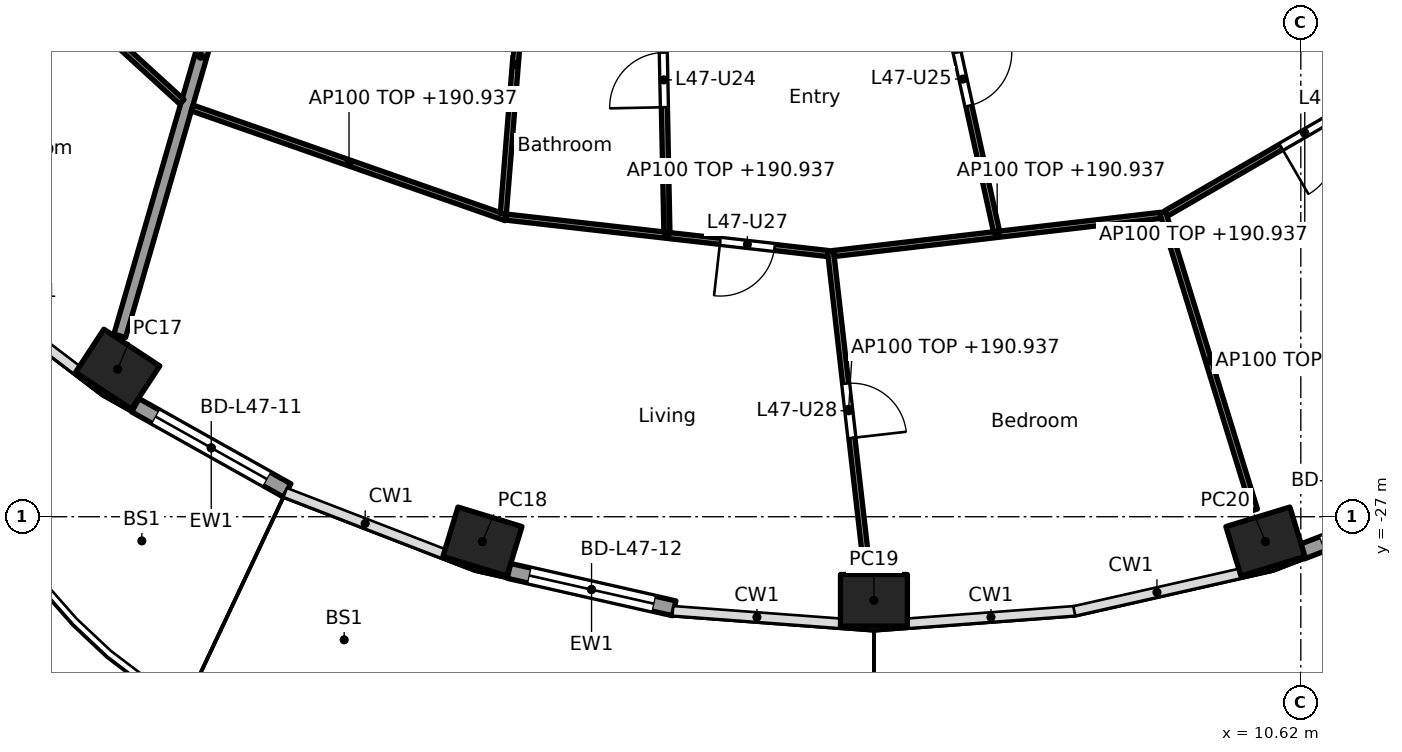
"""IFC4 building model, lengths in metres.
Left out: names, types, materials, properties, quantities, classifications, styles, units other than length and angle.
Written with IfcOpenShell. Run it as: python <this file> out.ifc"""

import sys

from ifc_helpers import new_model, si_unit, direction, frame, frame_2d, origin, origin_2d, place, context, subcontext, project, spatial, rectangle, hollow_rectangle, extrude, element, fill, save


model = new_model("IFC4")
c1 = context("Model", 3, precision=1e-05, world=origin(), true_north=direction((0.0, 1.0)))
c2 = subcontext(c1, "Body", "Model", "MODEL_VIEW")
j1 = project(units=[si_unit("LENGTHUNIT", "METRE"), si_unit("PLANEANGLEUNIT", "RADIAN")], contexts=[c1])
p1 = place(None, origin())
s1 = spatial("IfcSite", under=j1, at=p1, CompositionType="ELEMENT")
p2 = place(p1, origin())
s2 = spatial("IfcBuilding", under=s1, at=p2, CompositionType="ELEMENT")
p3 = place(p2, frame((0.0, 0.0, 188.1)))
s3 = spatial("IfcBuildingStorey", under=s2, at=p3, CompositionType="ELEMENT", Elevation=188.1)
for number, where, z_axis, x_axis in (
    (1, (-8.837, -24.573, 0.0), (0.0, 0.0, 1.0), (0.836, -0.549, 0.0)),
    (2, (-2.838, -27.408, 0.0), (0.0, 0.0, 1.0), (0.957, -0.292, 0.0)),
    (3, (3.6, -28.375, 0.0), (0.0, 0.0, 1.0), (1.0, 0.0, 0.0)),
    (4, (10.038, -27.408, 0.0), (0.0, 0.0, 1.0), (0.957, 0.292, 0.0)),
):
    element("IfcColumn", number, at=place(p3, frame(where, z_axis=z_axis, x_axis=x_axis)), inside=s3, PredefinedType="COLUMN", context=c2, shape_type="SweptSolid", body=[
        extrude(hollow_rectangle(XDim=1.1, YDim=0.85, WallThickness=0.036, at=origin_2d()), origin(), (0.0, 0.0, 1.0), 3.7),
    ])
p4 = place(p3, frame((-6.049, -26.568, 0.0), z_axis=(0.0, 0.0, 1.0), x_axis=(-0.872078262455, 0.489366431371, 0.0)))
e5 = element("IfcWall", 5, at=p4, inside=s3, PredefinedType="SOLIDWALL", context=c2, shape_type="SweptSolid", body=[
    extrude(rectangle(XDim=2.864, YDim=0.25, at=frame_2d((1.432, 0.0))), origin(), (0.0, 0.0, 1.0), 3.44),
])
p5 = place(p4, frame((0.382, 0.0, 0.0)))
e6 = element("IfcOpeningElement", 6, at=p5, cuts=e5, PredefinedType="OPENING", context=c2, shape_type="SweptSolid", body=[
    extrude(rectangle(XDim=2.1, YDim=2.4, at=frame_2d((1.05, 1.2))), frame((0.0, 0.135, 0.0), z_axis=(0.0, -1.0, 0.0), x_axis=(1.0, 0.0, 0.0)), (0.0, 0.0, 1.0), 0.27),
])
p6 = place(p3, frame((0.315, -28.506, 0.0), z_axis=(0.0, 0.0, 1.0), x_axis=(-0.975324329911, 0.220776926974, 0.0)))
e7 = element("IfcWall", 7, at=p6, inside=s3, PredefinedType="SOLIDWALL", context=c2, shape_type="SweptSolid", body=[
    extrude(rectangle(XDim=2.788, YDim=0.25, at=frame_2d((1.394, 0.0))), origin(), (0.0, 0.0, 1.0), 3.44),
])
p7 = place(p6, frame((0.344, 0.0, 0.0)))
e8 = element("IfcOpeningElement", 8, at=p7, cuts=e7, PredefinedType="OPENING", context=c2, shape_type="SweptSolid", body=[
    extrude(rectangle(XDim=2.1, YDim=2.4, at=frame_2d((1.05, 1.2))), frame((0.0, 0.135, 0.0), z_axis=(0.0, -1.0, 0.0), x_axis=(1.0, 0.0, 0.0)), (0.0, 0.0, 1.0), 0.27),
])
p8 = place(p3, frame((13.266, -26.56, 0.0), z_axis=(0.0, 0.0, 1.0), x_axis=(-0.932806734513, -0.360377019311, 0.0)))
e9 = element("IfcWall", 9, at=p8, inside=s3, PredefinedType="SOLIDWALL", context=c2, shape_type="SweptSolid", body=[
    extrude(rectangle(XDim=2.82, YDim=0.25, at=frame_2d((1.41, 0.0))), origin(), (0.0, 0.0, 1.0), 3.44),
])
p9 = place(p8, frame((0.36, 0.0, 0.0)))
e10 = element("IfcOpeningElement", 10, at=p9, cuts=e9, PredefinedType="OPENING", context=c2, shape_type="SweptSolid", body=[
    extrude(rectangle(XDim=2.1, YDim=2.4, at=frame_2d((1.05, 1.2))), frame((0.0, 0.135, 0.0), z_axis=(0.0, -1.0, 0.0), x_axis=(1.0, 0.0, 0.0)), (0.0, 0.0, 1.0), 0.27),
])
p10 = place(p3, frame((-6.137, -14.83, 0.0), z_axis=(0.0, 0.0, 1.0), x_axis=(-0.278461169897, -0.96044748782, 0.0)))
e11 = element("IfcWall", 11, at=p10, inside=s3, PredefinedType="PARTITIONING", context=c2, shape_type="SweptSolid", body=[
    extrude(rectangle(XDim=9.573, YDim=0.2, at=frame_2d((4.787, 0.0))), origin(), (0.0, 0.0, 1.0), 2.837),
])
p11 = place(p3, frame((-11.766, -16.535, 0.0), z_axis=(0.0, 0.0, 1.0), x_axis=(0.73807320557, -0.674720640872, 0.0)))
e12 = element("IfcWall", 12, at=p11, inside=s3, PredefinedType="PARTITIONING", context=c2, shape_type="SweptSolid", body=[
    extrude(rectangle(XDim=5.399, YDim=0.1, at=frame_2d((2.699, 0.0))), origin(), (0.0, 0.0, 1.0), 2.837),
])
p12 = place(p3, frame((-7.613, -20.278, 0.0), z_axis=(0.0, 0.0, 1.0), x_axis=(0.943918212431, -0.330179357684, 0.0)))
e13 = element("IfcWall", 13, at=p12, inside=s3, PredefinedType="PARTITIONING", context=c2, shape_type="SweptSolid", body=[
    extrude(rectangle(XDim=5.467, YDim=0.1, at=frame_2d((2.734, 0.0))), origin(), (0.0, 0.0, 1.0), 2.837),
])
p13 = place(p3, frame((-2.101, -17.113, 0.0), z_axis=(0.0, 0.0, 1.0), x_axis=(-0.080183022299, -0.996780157776, 0.0)))
e14 = element("IfcWall", 14, at=p13, inside=s3, PredefinedType="PARTITIONING", context=c2, shape_type="SweptSolid", body=[
    extrude(rectangle(XDim=4.92, YDim=0.1, at=frame_2d((2.46, 0.0))), origin(), (0.0, 0.0, 1.0), 3.44),
])
p14 = place(p3, frame((-2.449, -22.073, 0.0), z_axis=(0.0, 0.0, 1.0), x_axis=(0.993660315081, -0.112424099879, 0.0)))
e15 = element("IfcWall", 15, at=p14, inside=s3, PredefinedType="PARTITIONING", context=c2, shape_type="SweptSolid", body=[
    extrude(rectangle(XDim=5.325, YDim=0.1, at=frame_2d((2.662, 0.0))), origin(), (0.0, 0.0, 1.0), 2.837),
])
p15 = place(p14, frame((3.544, 0.0, 0.0)))
e16 = element("IfcOpeningElement", 16, at=p15, cuts=e15, PredefinedType="OPENING", context=c2, shape_type="SweptSolid", body=[
    extrude(rectangle(XDim=0.9, YDim=2.1, at=frame_2d((0.45, 1.05))), frame((0.0, 0.06, 0.0), z_axis=(0.0, -1.0, 0.0), x_axis=(1.0, 0.0, 0.0)), (0.0, 0.0, 1.0), 0.12),
])
p16 = place(p3, frame((0.002, -12.665, 0.0), z_axis=(0.0, 0.0, 1.0), x_axis=(0.019992969345, -0.999800120613, 0.0)))
e17 = element("IfcWall", 17, at=p16, inside=s3, PredefinedType="PARTITIONING", context=c2, shape_type="SweptSolid", body=[
    extrude(rectangle(XDim=9.659, YDim=0.1, at=frame_2d((4.83, 0.0))), origin(), (0.0, 0.0, 1.0), 2.756),
])
p17 = place(p16, frame((1.873, 0.0, 0.0)))
e18 = element("IfcOpeningElement", 18, at=p17, cuts=e17, PredefinedType="OPENING", context=c2, shape_type="SweptSolid", body=[
    extrude(rectangle(XDim=0.9, YDim=2.1, at=frame_2d((0.45, 1.05))), frame((0.0, 0.06, 0.0), z_axis=(0.0, -1.0, 0.0), x_axis=(1.0, 0.0, 0.0)), (0.0, 0.0, 1.0), 0.12),
])
p18 = place(p16, frame((6.703, 0.0, 0.0)))
e19 = element("IfcOpeningElement", 19, at=p18, cuts=e17, PredefinedType="OPENING", context=c2, shape_type="SweptSolid", body=[
    extrude(rectangle(XDim=0.9, YDim=2.1, at=frame_2d((0.45, 1.05))), frame((0.0, 0.06, 0.0), z_axis=(0.0, -1.0, 0.0), x_axis=(1.0, 0.0, 0.0)), (0.0, 0.0, 1.0), 0.12),
])
p19 = place(p3, frame((2.885, -22.627, 0.0), z_axis=(0.0, 0.0, 1.0), x_axis=(0.113634556485, -0.993522615531, 0.0)))
e20 = element("IfcWall", 20, at=p19, inside=s3, PredefinedType="PARTITIONING", context=c2, shape_type="SweptSolid", body=[
    extrude(rectangle(XDim=5.244, YDim=0.1, at=frame_2d((2.622, 0.0))), origin(), (0.0, 0.0, 1.0), 2.837),
])
p20 = place(p19, frame((2.197, 0.0, 0.0)))
e21 = element("IfcOpeningElement", 21, at=p20, cuts=e20, PredefinedType="OPENING", context=c2, shape_type="SweptSolid", body=[
    extrude(rectangle(XDim=0.9, YDim=2.1, at=frame_2d((0.45, 1.05))), frame((0.0, 0.06, 0.0), z_axis=(0.0, -1.0, 0.0), x_axis=(1.0, 0.0, 0.0)), (0.0, 0.0, 1.0), 0.12),
])
p21 = place(p3, frame((2.941, -22.671, 0.0), z_axis=(0.0, 0.0, 1.0), x_axis=(0.993245806382, 0.1160291692, 0.0)))
e22 = element("IfcWall", 22, at=p21, inside=s3, PredefinedType="PARTITIONING", context=c2, shape_type="SweptSolid", body=[
    extrude(rectangle(XDim=5.408, YDim=0.1, at=frame_2d((2.704, 0.0))), origin(), (0.0, 0.0, 1.0), 2.837),
])
p22 = place(p3, frame((3.491, -12.662, 0.0), z_axis=(0.0, 0.0, 1.0), x_axis=(0.215082442833, -0.976595895335, 0.0)))
e23 = element("IfcWall", 23, at=p22, inside=s3, PredefinedType="PARTITIONING", context=c2, shape_type="SweptSolid", body=[
    extrude(rectangle(XDim=9.878, YDim=0.1, at=frame_2d((4.939, 0.0))), origin(), (0.0, 0.0, 1.0), 2.756),
])
p23 = place(p22, frame((0.35, 0.0, 0.0)))
e24 = element("IfcOpeningElement", 24, at=p23, cuts=e23, PredefinedType="OPENING", context=c2, shape_type="SweptSolid", body=[
    extrude(rectangle(XDim=0.9, YDim=2.1, at=frame_2d((0.45, 1.05))), frame((0.0, 0.06, 0.0), z_axis=(0.0, -1.0, 0.0), x_axis=(1.0, 0.0, 0.0)), (0.0, 0.0, 1.0), 0.12),
])
p24 = place(p22, frame((6.861, 0.0, 0.0)))
e25 = element("IfcOpeningElement", 25, at=p24, cuts=e23, PredefinedType="OPENING", context=c2, shape_type="SweptSolid", body=[
    extrude(rectangle(XDim=0.9, YDim=2.1, at=frame_2d((0.45, 1.05))), frame((0.0, 0.06, 0.0), z_axis=(0.0, -1.0, 0.0), x_axis=(1.0, 0.0, 0.0)), (0.0, 0.0, 1.0), 0.12),
])
p25 = place(p3, frame((8.347, -21.99, 0.0), z_axis=(0.0, 0.0, 1.0), x_axis=(0.294828785667, -0.955550096616, 0.0)))
e26 = element("IfcWall", 26, at=p25, inside=s3, PredefinedType="PARTITIONING", context=c2, shape_type="SweptSolid", body=[
    extrude(rectangle(XDim=5.126, YDim=0.1, at=frame_2d((2.563, 0.0))), origin(), (0.0, 0.0, 1.0), 2.837),
])
p26 = place(p3, frame((8.405, -22.013, 0.0), z_axis=(0.0, 0.0, 1.0), x_axis=(0.865277177388, 0.501293732547, 0.0)))
e27 = element("IfcWall", 27, at=p26, inside=s3, PredefinedType="PARTITIONING", context=c2, shape_type="SweptSolid", body=[
    extrude(rectangle(XDim=5.27, YDim=0.1, at=frame_2d((2.635, 0.0))), origin(), (0.0, 0.0, 1.0), 2.837),
])
p27 = place(p26, frame((2.185, 0.0, 0.0)))
e28 = element("IfcOpeningElement", 28, at=p27, cuts=e27, PredefinedType="OPENING", context=c2, shape_type="SweptSolid", body=[
    extrude(rectangle(XDim=0.9, YDim=2.1, at=frame_2d((0.45, 1.05))), frame((0.0, 0.06, 0.0), z_axis=(0.0, -1.0, 0.0), x_axis=(1.0, 0.0, 0.0)), (0.0, 0.0, 1.0), 0.12),
])
p28 = place(p5, origin())
e29 = element("IfcDoor", 29, at=p28, inside=s3, OperationType="SLIDING_TO_LEFT", PredefinedType="DOOR", context=c2, shape_type="SweptSolid", body=[
    extrude(rectangle(XDim=2.1, YDim=2.4, at=frame_2d((1.05, 1.2))), frame((0.0, 0.025, 0.0), z_axis=(0.0, -1.0, 0.0), x_axis=(1.0, 0.0, 0.0)), (0.0, 0.0, 1.0), 0.05),
])
fill(e6, e29)
p29 = place(p7, origin())
e30 = element("IfcDoor", 30, at=p29, inside=s3, OperationType="SLIDING_TO_LEFT", PredefinedType="DOOR", context=c2, shape_type="SweptSolid", body=[
    extrude(rectangle(XDim=2.1, YDim=2.4, at=frame_2d((1.05, 1.2))), frame((0.0, 0.025, 0.0), z_axis=(0.0, -1.0, 0.0), x_axis=(1.0, 0.0, 0.0)), (0.0, 0.0, 1.0), 0.05),
])
fill(e8, e30)
p30 = place(p9, origin())
e31 = element("IfcDoor", 31, at=p30, inside=s3, OperationType="SLIDING_TO_LEFT", PredefinedType="DOOR", context=c2, shape_type="SweptSolid", body=[
    extrude(rectangle(XDim=2.1, YDim=2.4, at=frame_2d((1.05, 1.2))), frame((0.0, 0.025, 0.0), z_axis=(0.0, -1.0, 0.0), x_axis=(1.0, 0.0, 0.0)), (0.0, 0.0, 1.0), 0.05),
])
fill(e10, e31)
p31 = place(p18, frame((0.9, 0.0, 0.0), x_axis=(-1.0, 0.0, 0.0)))
e32 = element("IfcDoor", 32, at=p31, inside=s3, OperationType="SINGLE_SWING_LEFT", PredefinedType="DOOR", context=c2, shape_type="SweptSolid", body=[
    extrude(rectangle(XDim=0.9, YDim=2.1, at=frame_2d((0.45, 1.05))), frame((0.0, 0.025, 0.0), z_axis=(0.0, -1.0, 0.0), x_axis=(1.0, 0.0, 0.0)), (0.0, 0.0, 1.0), 0.05),
])
fill(e19, e32)
p32 = place(p24, origin())
e33 = element("IfcDoor", 33, at=p32, inside=s3, OperationType="SINGLE_SWING_LEFT", PredefinedType="DOOR", context=c2, shape_type="SweptSolid", body=[
    extrude(rectangle(XDim=0.9, YDim=2.1, at=frame_2d((0.45, 1.05))), frame((0.0, 0.025, 0.0), z_axis=(0.0, -1.0, 0.0), x_axis=(1.0, 0.0, 0.0)), (0.0, 0.0, 1.0), 0.05),
])
fill(e25, e33)
p33 = place(p15, frame((0.9, 0.0, 0.0), x_axis=(-1.0, 0.0, 0.0)))
e34 = element("IfcDoor", 34, at=p33, inside=s3, OperationType="SINGLE_SWING_RIGHT", PredefinedType="DOOR", context=c2, shape_type="SweptSolid", body=[
    extrude(rectangle(XDim=0.9, YDim=2.1, at=frame_2d((0.45, 1.05))), frame((0.0, 0.025, 0.0), z_axis=(0.0, -1.0, 0.0), x_axis=(1.0, 0.0, 0.0)), (0.0, 0.0, 1.0), 0.05),
])
fill(e16, e34)
p34 = place(p20, origin())
e35 = element("IfcDoor", 35, at=p34, inside=s3, OperationType="SINGLE_SWING_RIGHT", PredefinedType="DOOR", context=c2, shape_type="SweptSolid", body=[
    extrude(rectangle(XDim=0.9, YDim=2.1, at=frame_2d((0.45, 1.05))), frame((0.0, 0.025, 0.0), z_axis=(0.0, -1.0, 0.0), x_axis=(1.0, 0.0, 0.0)), (0.0, 0.0, 1.0), 0.05),
])
fill(e21, e35)
p35 = place(p27, frame((0.9, 0.0, 0.0), x_axis=(-1.0, 0.0, 0.0)))
e36 = element("IfcDoor", 36, at=p35, inside=s3, OperationType="SINGLE_SWING_RIGHT", PredefinedType="DOOR", context=c2, shape_type="SweptSolid", body=[
    extrude(rectangle(XDim=0.9, YDim=2.1, at=frame_2d((0.45, 1.05))), frame((0.0, 0.025, 0.0), z_axis=(0.0, -1.0, 0.0), x_axis=(1.0, 0.0, 0.0)), (0.0, 0.0, 1.0), 0.05),
])
fill(e28, e36)
save(model, sys.argv[1])
